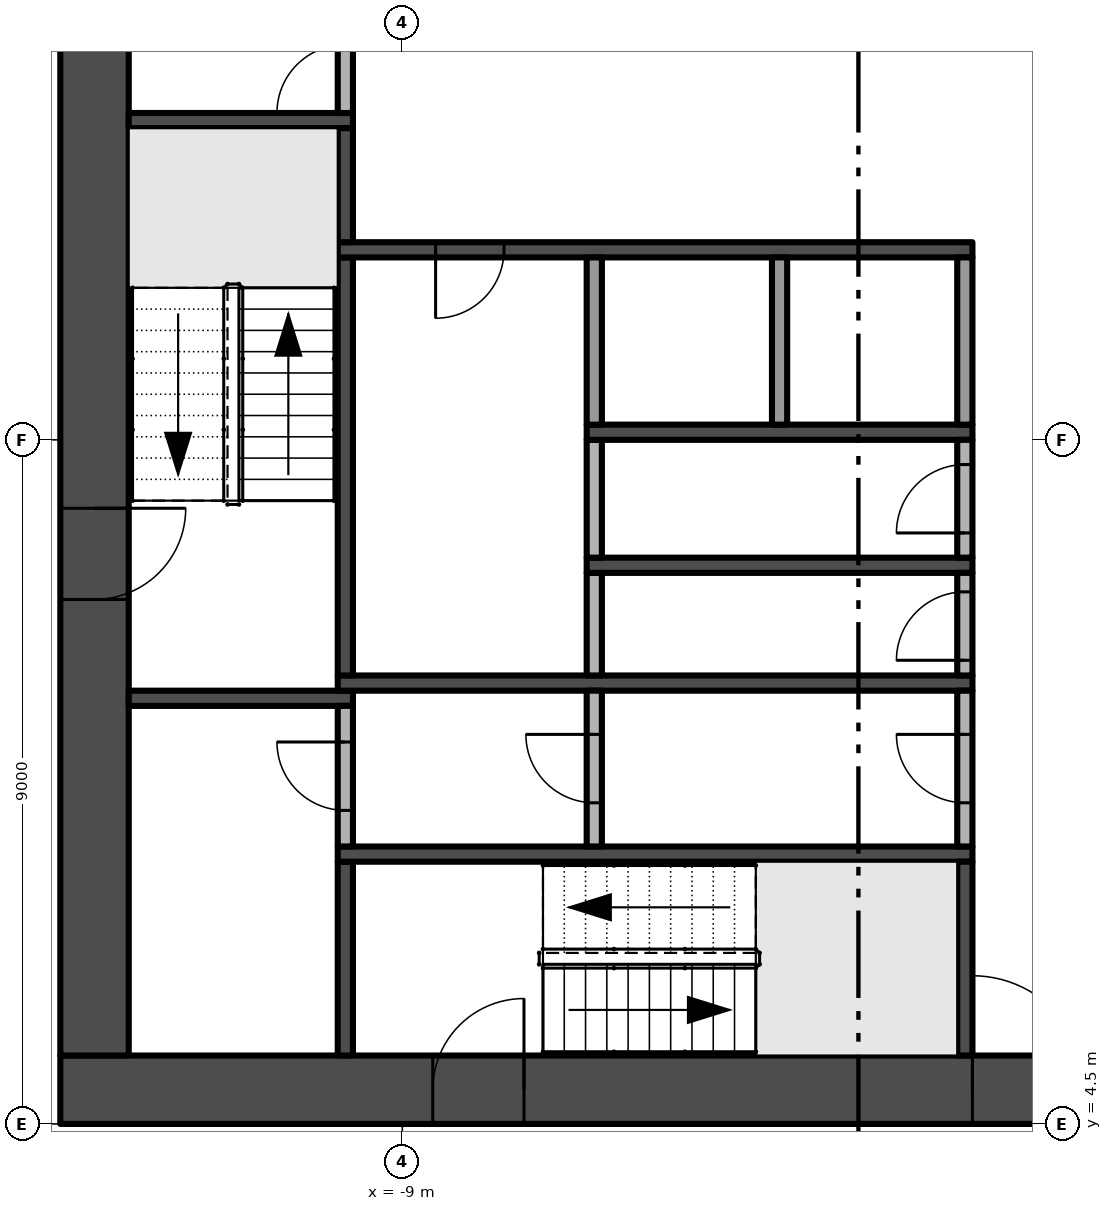
"""IFC4 building model, lengths in metres.
Left out: names, types, materials, properties, quantities, classifications, styles, units other than length and angle.
Written with IfcOpenShell. Run it as: python <this file> out.ifc"""

import sys

from ifc_helpers import new_model, si_unit, direction, frame, frame_2d, origin, place, context, subcontext, project, spatial, rectangle, extrude, element, fill, save


model = new_model("IFC4")
c1 = context("Model", 3, precision=1e-05, world=origin(), true_north=direction((0.0, 1.0)))
c2 = subcontext(c1, "Body", "Model", "MODEL_VIEW")
j1 = project(units=[si_unit("LENGTHUNIT", "METRE"), si_unit("PLANEANGLEUNIT", "RADIAN")], contexts=[c1])
p1 = place(None, origin())
s1 = spatial("IfcSite", under=j1, at=p1, CompositionType="ELEMENT")
p2 = place(p1, origin())
s2 = spatial("IfcBuilding", under=s1, at=p2, CompositionType="ELEMENT")
p3 = place(p2, frame((0.0, 0.0, 45.4)))
s3 = spatial("IfcBuildingStorey", under=s2, at=p3, CompositionType="ELEMENT", Elevation=45.4)
p4 = place(p3, frame((-13.5, 4.95, -0.3), z_axis=(0.0, 0.0, 1.0), x_axis=(1.0, 0.0, 0.0)))
e1 = element("IfcWall", 1, at=p4, inside=s3, PredefinedType="SHEAR", context=c2, shape_type="SweptSolid", body=[
    extrude(rectangle(XDim=27.0, YDim=0.9, at=frame_2d((13.5, 0.0))), origin(), (0.0, 0.0, 1.0), 3.8),
])
p5 = place(p4, frame((12.0, 0.0, 0.3)))
e2 = element("IfcOpeningElement", 2, at=p5, cuts=e1, PredefinedType="OPENING", context=c2, shape_type="SweptSolid", body=[
    extrude(rectangle(XDim=3.0, YDim=2.4, at=frame_2d((1.5, 1.2))), frame((0.0, 0.46, 0.0), z_axis=(0.0, -1.0, 0.0), x_axis=(1.0, 0.0, 0.0)), (0.0, 0.0, 1.0), 0.92),
])
p6 = place(p4, frame((4.9, 0.0, 0.3)))
e3 = element("IfcOpeningElement", 3, at=p6, cuts=e1, PredefinedType="OPENING", context=c2, shape_type="SweptSolid", body=[
    extrude(rectangle(XDim=1.2, YDim=2.2, at=frame_2d((0.6, 1.1))), frame((0.0, 0.46, 0.0), z_axis=(0.0, -1.0, 0.0), x_axis=(1.0, 0.0, 0.0)), (0.0, 0.0, 1.0), 0.92),
])
p7 = place(p4, frame((20.75, 0.0, 0.3)))
e4 = element("IfcOpeningElement", 4, at=p7, cuts=e1, PredefinedType="OPENING", context=c2, shape_type="SweptSolid", body=[
    extrude(rectangle(XDim=1.5, YDim=2.2, at=frame_2d((0.75, 1.1))), frame((0.0, 0.46, 0.0), z_axis=(0.0, -1.0, 0.0), x_axis=(1.0, 0.0, 0.0)), (0.0, 0.0, 1.0), 0.92),
])
p8 = place(p4, frame((17.4, 0.0, 0.3)))
e5 = element("IfcOpeningElement", 5, at=p8, cuts=e1, PredefinedType="OPENING", context=c2, shape_type="SweptSolid", body=[
    extrude(rectangle(XDim=1.2, YDim=2.2, at=frame_2d((0.6, 1.1))), frame((0.0, 0.46, 0.0), z_axis=(0.0, -1.0, 0.0), x_axis=(1.0, 0.0, 0.0)), (0.0, 0.0, 1.0), 0.92),
])
p9 = place(p3, frame((-13.05, 21.6, -0.3), z_axis=(0.0, 0.0, 1.0), x_axis=(0.0, -1.0, 0.0)))
e6 = element("IfcWall", 6, at=p9, inside=s3, PredefinedType="SHEAR", context=c2, shape_type="SweptSolid", body=[
    extrude(rectangle(XDim=16.2, YDim=0.9, at=frame_2d((8.1, 0.0))), origin(), (0.0, 0.0, 1.0), 3.8),
])
p10 = place(p9, frame((9.0, 0.0, 0.3)))
e7 = element("IfcOpeningElement", 7, at=p10, cuts=e6, PredefinedType="OPENING", context=c2, shape_type="SweptSolid", body=[
    extrude(rectangle(XDim=1.2, YDim=2.2, at=frame_2d((0.6, 1.1))), frame((0.0, 0.46, 0.0), z_axis=(0.0, -1.0, 0.0), x_axis=(1.0, 0.0, 0.0)), (0.0, 0.0, 1.0), 0.92),
])
for number, where, z_axis, x_axis in (
    (8, (-12.6, 10.1, 0.0), (0.0, 0.0, 1.0), (1.0, 0.0, 0.0)),
    (9, (-12.6, 17.7, 0.0), (0.0, 0.0, 1.0), (1.0, 0.0, 0.0)),
):
    element("IfcWall", number, at=place(p3, frame(where, z_axis=z_axis, x_axis=x_axis)), inside=s3, PredefinedType="SHEAR", context=c2, shape_type="SweptSolid", body=[
        extrude(rectangle(XDim=2.95, YDim=0.2, at=frame_2d((1.475, 0.0))), origin(), (0.0, 0.0, 1.0), 3.5),
    ])
p11 = place(p3, frame((-9.75, 5.4, 0.0), z_axis=(0.0, 0.0, 1.0), x_axis=(0.0, 1.0, 0.0)))
e10 = element("IfcWall", 10, at=p11, inside=s3, PredefinedType="SHEAR", context=c2, shape_type="SweptSolid", body=[
    extrude(rectangle(XDim=2.55, YDim=0.2, at=frame_2d((1.275, 0.0))), origin(), (0.0, 0.0, 1.0), 3.5),
])
p12 = place(p3, frame((-9.85, 8.05, 0.0), z_axis=(0.0, 0.0, 1.0), x_axis=(1.0, 0.0, 0.0)))
e11 = element("IfcWall", 11, at=p12, inside=s3, PredefinedType="SHEAR", context=c2, shape_type="SweptSolid", body=[
    extrude(rectangle(XDim=8.35, YDim=0.2, at=frame_2d((4.175, 0.0))), origin(), (0.0, 0.0, 1.0), 3.5),
])
p13 = place(p3, frame((-9.75, 8.15, 0.0), z_axis=(0.0, 0.0, 1.0), x_axis=(0.0, 1.0, 0.0)))
e12 = element("IfcWall", 12, at=p13, inside=s3, PredefinedType="PARTITIONING", context=c2, shape_type="SweptSolid", body=[
    extrude(rectangle(XDim=1.85, YDim=0.2, at=frame_2d((0.925, 0.0))), origin(), (0.0, 0.0, 1.0), 3.5),
])
p14 = place(p13, frame((0.475, 0.0, 0.0)))
e13 = element("IfcOpeningElement", 13, at=p14, cuts=e12, PredefinedType="OPENING", context=c2, shape_type="SweptSolid", body=[
    extrude(rectangle(XDim=0.9, YDim=2.1, at=frame_2d((0.45, 1.05))), frame((0.0, 0.11, 0.0), z_axis=(0.0, -1.0, 0.0), x_axis=(1.0, 0.0, 0.0)), (0.0, 0.0, 1.0), 0.22),
])
p15 = place(p3, frame((-9.85, 10.3, 0.0), z_axis=(0.0, 0.0, 1.0), x_axis=(1.0, 0.0, 0.0)))
e14 = element("IfcWall", 14, at=p15, inside=s3, PredefinedType="SHEAR", context=c2, shape_type="SweptSolid", body=[
    extrude(rectangle(XDim=8.35, YDim=0.2, at=frame_2d((4.175, 0.0))), origin(), (0.0, 0.0, 1.0), 3.5),
])
p16 = place(p3, frame((-9.75, 10.4, 0.0), z_axis=(0.0, 0.0, 1.0), x_axis=(0.0, 1.0, 0.0)))
e15 = element("IfcWall", 15, at=p16, inside=s3, PredefinedType="SHEAR", context=c2, shape_type="SweptSolid", body=[
    extrude(rectangle(XDim=5.5, YDim=0.2, at=frame_2d((2.75, 0.0))), origin(), (0.0, 0.0, 1.0), 3.5),
])
p17 = place(p3, frame((-1.5, 16.0, 0.0), z_axis=(0.0, 0.0, 1.0), x_axis=(-1.0, 0.0, 0.0)))
e16 = element("IfcWall", 16, at=p17, inside=s3, PredefinedType="SHEAR", context=c2, shape_type="SweptSolid", body=[
    extrude(rectangle(XDim=8.35, YDim=0.2, at=frame_2d((4.175, 0.0))), origin(), (0.0, 0.0, 1.0), 3.5),
])
p18 = place(p17, frame((6.162, 0.0, 0.0)))
e17 = element("IfcOpeningElement", 17, at=p18, cuts=e16, PredefinedType="OPENING", context=c2, shape_type="SweptSolid", body=[
    extrude(rectangle(XDim=0.9, YDim=2.1, at=frame_2d((0.45, 1.05))), frame((0.0, 0.11, 0.0), z_axis=(0.0, -1.0, 0.0), x_axis=(1.0, 0.0, 0.0)), (0.0, 0.0, 1.0), 0.22),
])
p19 = place(p3, frame((-9.75, 16.1, 0.0), z_axis=(0.0, 0.0, 1.0), x_axis=(0.0, 1.0, 0.0)))
e18 = element("IfcWall", 18, at=p19, inside=s3, PredefinedType="SHEAR", context=c2, shape_type="SweptSolid", body=[
    extrude(rectangle(XDim=1.5, YDim=0.2, at=frame_2d((0.75, 0.0))), origin(), (0.0, 0.0, 1.0), 3.5),
])
p20 = place(p3, frame((-9.75, 17.8, 0.0), z_axis=(0.0, 0.0, 1.0), x_axis=(0.0, 1.0, 0.0)))
e19 = element("IfcWall", 19, at=p20, inside=s3, PredefinedType="PARTITIONING", context=c2, shape_type="SweptSolid", body=[
    extrude(rectangle(XDim=1.4, YDim=0.2, at=frame_2d((0.7, 0.0))), origin(), (0.0, 0.0, 1.0), 3.5),
])
p21 = place(p20, origin())
e20 = element("IfcOpeningElement", 20, at=p21, cuts=e19, PredefinedType="OPENING", context=c2, shape_type="SweptSolid", body=[
    extrude(rectangle(XDim=0.9, YDim=2.1, at=frame_2d((0.45, 1.05))), frame((0.0, 0.11, 0.0), z_axis=(0.0, -1.0, 0.0), x_axis=(1.0, 0.0, 0.0)), (0.0, 0.0, 1.0), 0.22),
])
p22 = place(p3, frame((-6.475, 8.15, 0.0), z_axis=(0.0, 0.0, 1.0), x_axis=(0.0, 1.0, 0.0)))
e21 = element("IfcWall", 21, at=p22, inside=s3, PredefinedType="PARTITIONING", context=c2, shape_type="SweptSolid", body=[
    extrude(rectangle(XDim=2.05, YDim=0.2, at=frame_2d((1.025, 0.0))), origin(), (0.0, 0.0, 1.0), 3.5),
])
p23 = place(p22, frame((0.575, 0.0, 0.0)))
e22 = element("IfcOpeningElement", 22, at=p23, cuts=e21, PredefinedType="OPENING", context=c2, shape_type="SweptSolid", body=[
    extrude(rectangle(XDim=0.9, YDim=2.1, at=frame_2d((0.45, 1.05))), frame((0.0, 0.11, 0.0), z_axis=(0.0, -1.0, 0.0), x_axis=(1.0, 0.0, 0.0)), (0.0, 0.0, 1.0), 0.22),
])
p24 = place(p3, frame((-6.475, 10.4, 0.0), z_axis=(0.0, 0.0, 1.0), x_axis=(0.0, 1.0, 0.0)))
e23 = element("IfcWall", 23, at=p24, inside=s3, PredefinedType="PARTITIONING", context=c2, shape_type="SweptSolid", body=[
    extrude(rectangle(XDim=1.35, YDim=0.2, at=frame_2d((0.675, 0.0))), origin(), (0.0, 0.0, 1.0), 3.5),
])
p25 = place(p3, frame((-6.575, 11.85, 0.0), z_axis=(0.0, 0.0, 1.0), x_axis=(1.0, 0.0, 0.0)))
e24 = element("IfcWall", 24, at=p25, inside=s3, PredefinedType="SHEAR", context=c2, shape_type="SweptSolid", body=[
    extrude(rectangle(XDim=5.075, YDim=0.2, at=frame_2d((2.538, 0.0))), origin(), (0.0, 0.0, 1.0), 3.5),
])
p26 = place(p3, frame((-6.475, 11.95, 0.0), z_axis=(0.0, 0.0, 1.0), x_axis=(0.0, 1.0, 0.0)))
e25 = element("IfcWall", 25, at=p26, inside=s3, PredefinedType="PARTITIONING", context=c2, shape_type="SweptSolid", body=[
    extrude(rectangle(XDim=1.55, YDim=0.2, at=frame_2d((0.775, 0.0))), origin(), (0.0, 0.0, 1.0), 3.5),
])
p27 = place(p3, frame((-6.575, 13.6, 0.0), z_axis=(0.0, 0.0, 1.0), x_axis=(1.0, 0.0, 0.0)))
e26 = element("IfcWall", 26, at=p27, inside=s3, PredefinedType="SHEAR", context=c2, shape_type="SweptSolid", body=[
    extrude(rectangle(XDim=5.075, YDim=0.2, at=frame_2d((2.538, 0.0))), origin(), (0.0, 0.0, 1.0), 3.5),
])
for number, where, z_axis, x_axis in (
    (27, (-6.475, 13.7, 0.0), (0.0, 0.0, 1.0), (0.0, 1.0, 0.0)),
    (28, (-4.037, 13.7, 0.0), (0.0, 0.0, 1.0), (0.0, 1.0, 0.0)),
):
    element("IfcWall", number, at=place(p3, frame(where, z_axis=z_axis, x_axis=x_axis)), inside=s3, PredefinedType="PARTITIONING", context=c2, shape_type="SweptSolid", body=[
        extrude(rectangle(XDim=2.2, YDim=0.2, at=frame_2d((1.1, 0.0))), origin(), (0.0, 0.0, 1.0), 3.5),
    ])
p28 = place(p3, frame((-1.6, 5.4, 0.0), z_axis=(0.0, 0.0, 1.0), x_axis=(0.0, 1.0, 0.0)))
e29 = element("IfcWall", 29, at=p28, inside=s3, PredefinedType="SHEAR", context=c2, shape_type="SweptSolid", body=[
    extrude(rectangle(XDim=2.55, YDim=0.2, at=frame_2d((1.275, 0.0))), origin(), (0.0, 0.0, 1.0), 3.5),
])
p29 = place(p3, frame((-1.6, 8.15, 0.0), z_axis=(0.0, 0.0, 1.0), x_axis=(0.0, 1.0, 0.0)))
e30 = element("IfcWall", 30, at=p29, inside=s3, PredefinedType="PARTITIONING", context=c2, shape_type="SweptSolid", body=[
    extrude(rectangle(XDim=2.05, YDim=0.2, at=frame_2d((1.025, 0.0))), origin(), (0.0, 0.0, 1.0), 3.5),
])
p30 = place(p29, frame((0.575, 0.0, 0.0)))
e31 = element("IfcOpeningElement", 31, at=p30, cuts=e30, PredefinedType="OPENING", context=c2, shape_type="SweptSolid", body=[
    extrude(rectangle(XDim=0.9, YDim=2.1, at=frame_2d((0.45, 1.05))), frame((0.0, 0.11, 0.0), z_axis=(0.0, -1.0, 0.0), x_axis=(1.0, 0.0, 0.0)), (0.0, 0.0, 1.0), 0.22),
])
p31 = place(p3, frame((-1.6, 10.4, 0.0), z_axis=(0.0, 0.0, 1.0), x_axis=(0.0, 1.0, 0.0)))
e32 = element("IfcWall", 32, at=p31, inside=s3, PredefinedType="PARTITIONING", context=c2, shape_type="SweptSolid", body=[
    extrude(rectangle(XDim=1.35, YDim=0.2, at=frame_2d((0.675, 0.0))), origin(), (0.0, 0.0, 1.0), 3.5),
])
p32 = place(p31, frame((0.2, 0.0, 0.0)))
e33 = element("IfcOpeningElement", 33, at=p32, cuts=e32, PredefinedType="OPENING", context=c2, shape_type="SweptSolid", body=[
    extrude(rectangle(XDim=0.9, YDim=2.1, at=frame_2d((0.45, 1.05))), frame((0.0, 0.11, 0.0), z_axis=(0.0, -1.0, 0.0), x_axis=(1.0, 0.0, 0.0)), (0.0, 0.0, 1.0), 0.22),
])
p33 = place(p3, frame((-1.6, 11.95, 0.0), z_axis=(0.0, 0.0, 1.0), x_axis=(0.0, 1.0, 0.0)))
e34 = element("IfcWall", 34, at=p33, inside=s3, PredefinedType="PARTITIONING", context=c2, shape_type="SweptSolid", body=[
    extrude(rectangle(XDim=1.55, YDim=0.2, at=frame_2d((0.775, 0.0))), origin(), (0.0, 0.0, 1.0), 3.5),
])
p34 = place(p33, frame((0.325, 0.0, 0.0)))
e35 = element("IfcOpeningElement", 35, at=p34, cuts=e34, PredefinedType="OPENING", context=c2, shape_type="SweptSolid", body=[
    extrude(rectangle(XDim=0.9, YDim=2.1, at=frame_2d((0.45, 1.05))), frame((0.0, 0.11, 0.0), z_axis=(0.0, -1.0, 0.0), x_axis=(1.0, 0.0, 0.0)), (0.0, 0.0, 1.0), 0.22),
])
p35 = place(p3, frame((-1.6, 13.7, 0.0), z_axis=(0.0, 0.0, 1.0), x_axis=(0.0, 1.0, 0.0)))
e36 = element("IfcWall", 36, at=p35, inside=s3, PredefinedType="PARTITIONING", context=c2, shape_type="SweptSolid", body=[
    extrude(rectangle(XDim=2.2, YDim=0.2, at=frame_2d((1.1, 0.0))), origin(), (0.0, 0.0, 1.0), 3.5),
])
p36 = place(p5, frame((3.0, 0.0, 0.0), z_axis=(0.0, 0.0, 1.0), x_axis=(-1.0, 0.0, 0.0)))
e37 = element("IfcDoor", 37, at=p36, inside=s3, OperationType="DOUBLE_DOOR_SINGLE_SWING", PredefinedType="DOOR", context=c2, shape_type="SweptSolid", body=[
    extrude(rectangle(XDim=3.0, YDim=2.4, at=frame_2d((1.5, 1.2))), frame((0.0, 0.025, 0.0), z_axis=(0.0, -1.0, 0.0), x_axis=(1.0, 0.0, 0.0)), (0.0, 0.0, 1.0), 0.05),
])
fill(e2, e37)
p37 = place(p10, frame((1.2, 0.0, 0.0), z_axis=(0.0, 0.0, 1.0), x_axis=(-1.0, 0.0, 0.0)))
e38 = element("IfcDoor", 38, at=p37, inside=s3, OperationType="SINGLE_SWING_RIGHT", PredefinedType="DOOR", context=c2, shape_type="SweptSolid", body=[
    extrude(rectangle(XDim=1.2, YDim=2.2, at=frame_2d((0.6, 1.1))), frame((0.0, 0.025, 0.0), z_axis=(0.0, -1.0, 0.0), x_axis=(1.0, 0.0, 0.0)), (0.0, 0.0, 1.0), 0.05),
])
fill(e7, e38)
p38 = place(p6, frame((1.2, 0.0, 0.0), z_axis=(0.0, 0.0, 1.0), x_axis=(-1.0, 0.0, 0.0)))
e39 = element("IfcDoor", 39, at=p38, inside=s3, OperationType="SINGLE_SWING_LEFT", PredefinedType="DOOR", context=c2, shape_type="SweptSolid", body=[
    extrude(rectangle(XDim=1.2, YDim=2.2, at=frame_2d((0.6, 1.1))), frame((0.0, 0.025, 0.0), z_axis=(0.0, -1.0, 0.0), x_axis=(1.0, 0.0, 0.0)), (0.0, 0.0, 1.0), 0.05),
])
fill(e3, e39)
p39 = place(p18, origin())
e40 = element("IfcDoor", 40, at=p39, inside=s3, OperationType="SINGLE_SWING_RIGHT", PredefinedType="DOOR", context=c2, shape_type="SweptSolid", body=[
    extrude(rectangle(XDim=0.9, YDim=2.1, at=frame_2d((0.45, 1.05))), frame((0.0, 0.025, 0.0), z_axis=(0.0, -1.0, 0.0), x_axis=(1.0, 0.0, 0.0)), (0.0, 0.0, 1.0), 0.05),
])
fill(e17, e40)
p40 = place(p30, origin())
e41 = element("IfcDoor", 41, at=p40, inside=s3, OperationType="SINGLE_SWING_RIGHT", PredefinedType="DOOR", context=c2, shape_type="SweptSolid", body=[
    extrude(rectangle(XDim=0.9, YDim=2.1, at=frame_2d((0.45, 1.05))), frame((0.0, 0.025, 0.0), z_axis=(0.0, -1.0, 0.0), x_axis=(1.0, 0.0, 0.0)), (0.0, 0.0, 1.0), 0.05),
])
fill(e31, e41)
p41 = place(p32, origin())
e42 = element("IfcDoor", 42, at=p41, inside=s3, OperationType="SINGLE_SWING_LEFT", PredefinedType="DOOR", context=c2, shape_type="SweptSolid", body=[
    extrude(rectangle(XDim=0.9, YDim=2.1, at=frame_2d((0.45, 1.05))), frame((0.0, 0.025, 0.0), z_axis=(0.0, -1.0, 0.0), x_axis=(1.0, 0.0, 0.0)), (0.0, 0.0, 1.0), 0.05),
])
fill(e33, e42)
p42 = place(p34, origin())
e43 = element("IfcDoor", 43, at=p42, inside=s3, OperationType="SINGLE_SWING_LEFT", PredefinedType="DOOR", context=c2, shape_type="SweptSolid", body=[
    extrude(rectangle(XDim=0.9, YDim=2.1, at=frame_2d((0.45, 1.05))), frame((0.0, 0.025, 0.0), z_axis=(0.0, -1.0, 0.0), x_axis=(1.0, 0.0, 0.0)), (0.0, 0.0, 1.0), 0.05),
])
fill(e35, e43)
p43 = place(p21, origin())
e44 = element("IfcDoor", 44, at=p43, inside=s3, OperationType="SINGLE_SWING_LEFT", PredefinedType="DOOR", context=c2, shape_type="SweptSolid", body=[
    extrude(rectangle(XDim=0.9, YDim=2.1, at=frame_2d((0.45, 1.05))), frame((0.0, 0.025, 0.0), z_axis=(0.0, -1.0, 0.0), x_axis=(1.0, 0.0, 0.0)), (0.0, 0.0, 1.0), 0.05),
])
fill(e20, e44)
p44 = place(p23, origin())
e45 = element("IfcDoor", 45, at=p44, inside=s3, OperationType="SINGLE_SWING_RIGHT", PredefinedType="DOOR", context=c2, shape_type="SweptSolid", body=[
    extrude(rectangle(XDim=0.9, YDim=2.1, at=frame_2d((0.45, 1.05))), frame((0.0, 0.025, 0.0), z_axis=(0.0, -1.0, 0.0), x_axis=(1.0, 0.0, 0.0)), (0.0, 0.0, 1.0), 0.05),
])
fill(e22, e45)
p45 = place(p14, origin())
e46 = element("IfcDoor", 46, at=p45, inside=s3, OperationType="SINGLE_SWING_RIGHT", PredefinedType="DOOR", context=c2, shape_type="SweptSolid", body=[
    extrude(rectangle(XDim=0.9, YDim=2.1, at=frame_2d((0.45, 1.05))), frame((0.0, 0.025, 0.0), z_axis=(0.0, -1.0, 0.0), x_axis=(1.0, 0.0, 0.0)), (0.0, 0.0, 1.0), 0.05),
])
fill(e13, e46)
save(model, sys.argv[1])
